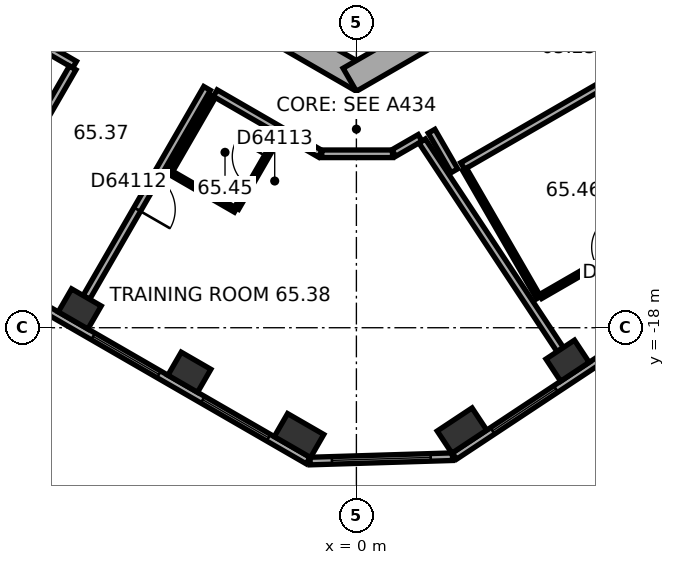
"""IFC4 building model, lengths in metres.
Left out: names, types, materials, properties, quantities, classifications, styles, units other than length and angle.
Written with IfcOpenShell. Run it as: python <this file> out.ifc"""

import sys

from ifc_helpers import new_model, si_unit, direction, frame, frame_2d, origin, origin_2d, place, context, subcontext, project, spatial, rectangle, extrude, element, fill, save


model = new_model("IFC4")
c1 = context("Model", 3, precision=1e-05, world=origin(), true_north=direction((0.0, 1.0)))
c2 = subcontext(c1, "Body", "Model", "MODEL_VIEW")
j1 = project(units=[si_unit("LENGTHUNIT", "METRE"), si_unit("PLANEANGLEUNIT", "RADIAN")], contexts=[c1])
p1 = place(None, origin())
s1 = spatial("IfcSite", under=j1, at=p1, CompositionType="ELEMENT")
p2 = place(p1, origin())
s2 = spatial("IfcBuilding", under=s1, at=p2, CompositionType="ELEMENT")
p3 = place(p2, frame((0.0, 0.0, 263.5)))
s3 = spatial("IfcBuildingStorey", under=s2, at=p3, CompositionType="ELEMENT", Elevation=263.5)
for number, where, z_axis, x_axis in (
    (1, (-7.28, -17.505, 0.0), (0.0, 0.0, 1.0), (0.866, -0.5, 0.0)),
    (2, (-4.395, -19.171, 0.0), (0.0, 0.0, 1.0), (0.866, -0.5, 0.0)),
):
    element("IfcColumn", number, at=place(p3, frame(where, z_axis=z_axis, x_axis=x_axis)), inside=s3, PredefinedType="COLUMN", context=c2, shape_type="SweptSolid", body=[
        extrude(rectangle(XDim=0.9, YDim=0.7, at=origin_2d()), origin(), (0.0, 0.0, 1.0), 3.7),
    ])
for number, where, z_axis, x_axis in (
    (3, (-1.509, -20.837, 0.0), (0.0, 0.0, 1.0), (0.866, -0.5, 0.0)),
    (4, (2.778, -20.706, 0.0), (0.0, 0.0, 1.0), (0.834, 0.552, 0.0)),
):
    element("IfcColumn", number, at=place(p3, frame(where, z_axis=z_axis, x_axis=x_axis)), inside=s3, PredefinedType="COLUMN", context=c2, shape_type="SweptSolid", body=[
        extrude(rectangle(XDim=1.1, YDim=0.7, at=origin_2d()), origin(), (0.0, 0.0, 1.0), 3.7),
    ])
p4 = place(p3, frame((5.557, -18.867, 0.0), z_axis=(0.0, 0.0, 1.0), x_axis=(0.833885822067, 0.551936985312, 0.0)))
e5 = element("IfcColumn", 5, at=p4, inside=s3, PredefinedType="COLUMN", context=c2, shape_type="SweptSolid", body=[
    extrude(rectangle(XDim=0.9, YDim=0.7, at=origin_2d()), origin(), (0.0, 0.0, 1.0), 3.7),
])
p5 = place(p3, frame((-10.025, -5.586, 0.0), z_axis=(0.0, 0.0, 1.0), x_axis=(0.866026453023, -0.499998182661, 0.0)))
e6 = element("IfcWall", 6, at=p5, inside=s3, PredefinedType="SHEAR", context=c2, shape_type="SweptSolid", body=[
    extrude(rectangle(XDim=11.778, YDim=0.7, at=frame_2d((5.889, 0.0))), origin(), (0.0, 0.0, 1.0), 3.7),
])
p6 = place(p5, frame((6.089, 0.0, 0.0)))
e7 = element("IfcOpeningElement", 7, at=p6, cuts=e6, PredefinedType="OPENING", context=c2, shape_type="SweptSolid", body=[
    extrude(rectangle(XDim=1.5, YDim=2.1, at=frame_2d((0.75, 1.05))), frame((0.0, 0.36, 0.0), z_axis=(0.0, -1.0, 0.0), x_axis=(1.0, 0.0, 0.0)), (0.0, 0.0, 1.0), 0.72),
])
p7 = place(p5, frame((1.539, 0.0, 0.0)))
e8 = element("IfcOpeningElement", 8, at=p7, cuts=e6, PredefinedType="OPENING", context=c2, shape_type="SweptSolid", body=[
    extrude(rectangle(XDim=1.1, YDim=2.1, at=frame_2d((0.55, 1.05))), frame((0.0, 0.36, 0.0), z_axis=(0.0, -1.0, 0.0), x_axis=(1.0, 0.0, 0.0)), (0.0, 0.0, 1.0), 0.72),
])
p8 = place(p5, frame((4.139, 0.0, 0.0)))
e9 = element("IfcOpeningElement", 9, at=p8, cuts=e6, PredefinedType="OPENING", context=c2, shape_type="SweptSolid", body=[
    extrude(rectangle(XDim=1.1, YDim=2.1, at=frame_2d((0.55, 1.05))), frame((0.0, 0.36, 0.0), z_axis=(0.0, -1.0, 0.0), x_axis=(1.0, 0.0, 0.0)), (0.0, 0.0, 1.0), 0.72),
])
p9 = place(p3, frame((-0.175, -11.475, 0.0), z_axis=(0.0, 0.0, 1.0), x_axis=(0.866026453023, 0.499998182661, 0.0)))
e10 = element("IfcWall", 10, at=p9, inside=s3, PredefinedType="SHEAR", context=c2, shape_type="SweptSolid", body=[
    extrude(rectangle(XDim=11.778, YDim=0.7, at=frame_2d((5.889, 0.0))), origin(), (0.0, 0.0, 1.0), 3.7),
])
p10 = place(p9, frame((2.439, 0.0, 0.0)))
e11 = element("IfcOpeningElement", 11, at=p10, cuts=e10, PredefinedType="OPENING", context=c2, shape_type="SweptSolid", body=[
    extrude(rectangle(XDim=1.1, YDim=2.1, at=frame_2d((0.55, 1.05))), frame((0.0, 0.36, 0.0), z_axis=(0.0, -1.0, 0.0), x_axis=(1.0, 0.0, 0.0)), (0.0, 0.0, 1.0), 0.72),
])
p11 = place(p9, frame((5.039, 0.0, 0.0)))
e12 = element("IfcOpeningElement", 12, at=p11, cuts=e10, PredefinedType="OPENING", context=c2, shape_type="SweptSolid", body=[
    extrude(rectangle(XDim=1.1, YDim=2.1, at=frame_2d((0.55, 1.05))), frame((0.0, 0.36, 0.0), z_axis=(0.0, -1.0, 0.0), x_axis=(1.0, 0.0, 0.0)), (0.0, 0.0, 1.0), 0.72),
])
p12 = place(p9, frame((7.639, 0.0, 0.0)))
e13 = element("IfcOpeningElement", 13, at=p12, cuts=e10, PredefinedType="OPENING", context=c2, shape_type="SweptSolid", body=[
    extrude(rectangle(XDim=1.1, YDim=2.1, at=frame_2d((0.55, 1.05))), frame((0.0, 0.36, 0.0), z_axis=(0.0, -1.0, 0.0), x_axis=(1.0, 0.0, 0.0)), (0.0, 0.0, 1.0), 0.72),
])
p13 = place(p3, frame((-16.626, -12.629, 0.0), z_axis=(0.0, 0.0, 1.0), x_axis=(0.866026460444, -0.499998169808, 0.0)))
e14 = element("IfcWall", 14, at=p13, inside=s3, PredefinedType="STANDARD", context=c2, shape_type="SweptSolid", body=[
    extrude(rectangle(XDim=17.731, YDim=0.2, at=frame_2d((8.866, 0.0))), origin(), (0.0, 0.0, 1.0), 3.7),
])
p14 = place(p13, frame((1.203, 0.0, 0.9)))
e15 = element("IfcOpeningElement", 15, at=p14, cuts=e14, PredefinedType="OPENING", context=c2, shape_type="SweptSolid", body=[
    extrude(rectangle(XDim=2.0, YDim=2.0, at=frame_2d((1.0, 1.0))), frame((0.0, 0.11, 0.0), z_axis=(0.0, -1.0, 0.0), x_axis=(1.0, 0.0, 0.0)), (0.0, 0.0, 1.0), 0.22),
])
p15 = place(p13, frame((4.535, 0.0, 0.9)))
e16 = element("IfcOpeningElement", 16, at=p15, cuts=e14, PredefinedType="OPENING", context=c2, shape_type="SweptSolid", body=[
    extrude(rectangle(XDim=2.0, YDim=2.0, at=frame_2d((1.0, 1.0))), frame((0.0, 0.11, 0.0), z_axis=(0.0, -1.0, 0.0), x_axis=(1.0, 0.0, 0.0)), (0.0, 0.0, 1.0), 0.22),
])
p16 = place(p13, frame((7.867, 0.0, 0.9)))
e17 = element("IfcOpeningElement", 17, at=p16, cuts=e14, PredefinedType="OPENING", context=c2, shape_type="SweptSolid", body=[
    extrude(rectangle(XDim=2.0, YDim=2.0, at=frame_2d((1.0, 1.0))), frame((0.0, 0.11, 0.0), z_axis=(0.0, -1.0, 0.0), x_axis=(1.0, 0.0, 0.0)), (0.0, 0.0, 1.0), 0.22),
])
p17 = place(p13, frame((11.198, 0.0, 0.9)))
e18 = element("IfcOpeningElement", 18, at=p17, cuts=e14, PredefinedType="OPENING", context=c2, shape_type="SweptSolid", body=[
    extrude(rectangle(XDim=2.0, YDim=2.0, at=frame_2d((1.0, 1.0))), frame((0.0, 0.11, 0.0), z_axis=(0.0, -1.0, 0.0), x_axis=(1.0, 0.0, 0.0)), (0.0, 0.0, 1.0), 0.22),
])
p18 = place(p13, frame((14.53, 0.0, 0.9)))
e19 = element("IfcOpeningElement", 19, at=p18, cuts=e14, PredefinedType="OPENING", context=c2, shape_type="SweptSolid", body=[
    extrude(rectangle(XDim=2.0, YDim=2.0, at=frame_2d((1.0, 1.0))), frame((0.0, 0.11, 0.0), z_axis=(0.0, -1.0, 0.0), x_axis=(1.0, 0.0, 0.0)), (0.0, 0.0, 1.0), 0.22),
])
p19 = place(p3, frame((-1.217, -21.508, 0.0), z_axis=(0.0, 0.0, 1.0), x_axis=(0.99953295295, 0.030559384285, 0.0)))
e20 = element("IfcWall", 20, at=p19, inside=s3, PredefinedType="STANDARD", context=c2, shape_type="SweptSolid", body=[
    extrude(rectangle(XDim=3.747, YDim=0.2, at=frame_2d((1.874, 0.0))), origin(), (0.0, 0.0, 1.0), 3.7),
])
p20 = place(p19, frame((0.573, 0.0, 0.9)))
e21 = element("IfcOpeningElement", 21, at=p20, cuts=e20, PredefinedType="OPENING", context=c2, shape_type="SweptSolid", body=[
    extrude(rectangle(XDim=2.6, YDim=2.0, at=frame_2d((1.3, 1.0))), frame((0.0, 0.11, 0.0), z_axis=(0.0, -1.0, 0.0), x_axis=(1.0, 0.0, 0.0)), (0.0, 0.0, 1.0), 0.22),
])
p21 = place(p3, frame((2.58, -21.377, 0.0), z_axis=(0.0, 0.0, 1.0), x_axis=(0.833888592176, 0.551932800112, 0.0)))
e22 = element("IfcWall", 22, at=p21, inside=s3, PredefinedType="STANDARD", context=c2, shape_type="SweptSolid", body=[
    extrude(rectangle(XDim=17.731, YDim=0.2, at=frame_2d((8.866, 0.0))), origin(), (0.0, 0.0, 1.0), 3.7),
])
p22 = place(p21, frame((1.202, 0.0, 0.9)))
e23 = element("IfcOpeningElement", 23, at=p22, cuts=e22, PredefinedType="OPENING", context=c2, shape_type="SweptSolid", body=[
    extrude(rectangle(XDim=2.0, YDim=2.0, at=frame_2d((1.0, 1.0))), frame((0.0, 0.11, 0.0), z_axis=(0.0, -1.0, 0.0), x_axis=(1.0, 0.0, 0.0)), (0.0, 0.0, 1.0), 0.22),
])
p23 = place(p21, frame((4.533, 0.0, 0.9)))
e24 = element("IfcOpeningElement", 24, at=p23, cuts=e22, PredefinedType="OPENING", context=c2, shape_type="SweptSolid", body=[
    extrude(rectangle(XDim=2.0, YDim=2.0, at=frame_2d((1.0, 1.0))), frame((0.0, 0.11, 0.0), z_axis=(0.0, -1.0, 0.0), x_axis=(1.0, 0.0, 0.0)), (0.0, 0.0, 1.0), 0.22),
])
p24 = place(p21, frame((7.865, 0.0, 0.9)))
e25 = element("IfcOpeningElement", 25, at=p24, cuts=e22, PredefinedType="OPENING", context=c2, shape_type="SweptSolid", body=[
    extrude(rectangle(XDim=2.0, YDim=2.0, at=frame_2d((1.0, 1.0))), frame((0.0, 0.11, 0.0), z_axis=(0.0, -1.0, 0.0), x_axis=(1.0, 0.0, 0.0)), (0.0, 0.0, 1.0), 0.22),
])
p25 = place(p21, frame((11.197, 0.0, 0.9)))
e26 = element("IfcOpeningElement", 26, at=p25, cuts=e22, PredefinedType="OPENING", context=c2, shape_type="SweptSolid", body=[
    extrude(rectangle(XDim=2.0, YDim=2.0, at=frame_2d((1.0, 1.0))), frame((0.0, 0.11, 0.0), z_axis=(0.0, -1.0, 0.0), x_axis=(1.0, 0.0, 0.0)), (0.0, 0.0, 1.0), 0.22),
])
p26 = place(p21, frame((14.528, 0.0, 0.9)))
e27 = element("IfcOpeningElement", 27, at=p26, cuts=e22, PredefinedType="OPENING", context=c2, shape_type="SweptSolid", body=[
    extrude(rectangle(XDim=2.0, YDim=2.0, at=frame_2d((1.0, 1.0))), frame((0.0, 0.11, 0.0), z_axis=(0.0, -1.0, 0.0), x_axis=(1.0, 0.0, 0.0)), (0.0, 0.0, 1.0), 0.22),
])
p27 = place(p3, frame((-11.501, -8.719, 0.0), z_axis=(0.0, 0.0, 1.0), x_axis=(0.866024434742, -0.500001678427, 0.0)))
e28 = element("IfcWall", 28, at=p27, inside=s3, PredefinedType="PARTITIONING", context=c2, shape_type="SweptSolid", body=[
    extrude(rectangle(XDim=4.718, YDim=0.2, at=frame_2d((2.359, 0.0))), origin(), (0.0, 0.0, 1.0), 3.42),
])
p28 = place(p3, frame((-9.99, -15.537, 0.0), z_axis=(0.0, 0.0, 1.0), x_axis=(0.499966611936, 0.866044679534, 0.0)))
e29 = element("IfcWall", 29, at=p28, inside=s3, PredefinedType="PARTITIONING", context=c2, shape_type="SweptSolid", body=[
    extrude(rectangle(XDim=5.049, YDim=0.2, at=frame_2d((2.524, 0.0))), origin(), (0.0, 0.0, 1.0), 2.87),
])
p29 = place(p28, frame((2.024, 0.0, 0.0)))
e30 = element("IfcOpeningElement", 30, at=p29, cuts=e29, PredefinedType="OPENING", context=c2, shape_type="SweptSolid", body=[
    extrude(rectangle(XDim=1.0, YDim=2.1, at=frame_2d((0.5, 1.05))), frame((0.0, 0.11, 0.0), z_axis=(0.0, -1.0, 0.0), x_axis=(1.0, 0.0, 0.0)), (0.0, 0.0, 1.0), 0.22),
])
p30 = place(p3, frame((-7.105, -17.202, 0.0), z_axis=(0.0, 0.0, 1.0), x_axis=(0.499988692146, 0.866031932279, 0.0)))
e31 = element("IfcWall", 31, at=p30, inside=s3, PredefinedType="PARTITIONING", context=c2, shape_type="SweptSolid", body=[
    extrude(rectangle(XDim=6.35, YDim=0.2, at=frame_2d((3.175, 0.0))), origin(), (0.0, 0.0, 1.0), 3.42),
])
p31 = place(p30, frame((2.675, 0.0, 0.0)))
e32 = element("IfcOpeningElement", 32, at=p31, cuts=e31, PredefinedType="OPENING", context=c2, shape_type="SweptSolid", body=[
    extrude(rectangle(XDim=1.0, YDim=2.1, at=frame_2d((0.5, 1.05))), frame((0.0, 0.11, 0.0), z_axis=(0.0, -1.0, 0.0), x_axis=(1.0, 0.0, 0.0)), (0.0, 0.0, 1.0), 0.22),
])
p32 = place(p3, frame((-4.913, -13.906, 0.0), z_axis=(0.0, 0.0, 1.0), x_axis=(0.500031774688, 0.866007057882, 0.0)))
e33 = element("IfcWall", 33, at=p32, inside=s3, PredefinedType="PARTITIONING", context=c2, shape_type="SweptSolid", body=[
    extrude(rectangle(XDim=2.3, YDim=0.12, at=frame_2d((1.15, 0.0))), origin(), (0.0, 0.0, 1.0), 3.42),
])
p33 = place(p3, frame((-3.713, -11.828, 0.0), z_axis=(0.0, 0.0, 1.0), x_axis=(0.866026321388, -0.499998410661, 0.0)))
e34 = element("IfcWall", 34, at=p33, inside=s3, PredefinedType="PARTITIONING", context=c2, shape_type="SweptSolid", body=[
    extrude(rectangle(XDim=3.191, YDim=0.2, at=frame_2d((1.595, 0.0))), origin(), (0.0, 0.0, 1.0), 3.42),
])
p34 = place(p3, frame((-3.181, -14.906, 0.0), z_axis=(0.0, 0.0, 1.0), x_axis=(-0.866043088465, 0.499969367985, 0.0)))
e35 = element("IfcWall", 35, at=p34, inside=s3, PredefinedType="PARTITIONING", context=c2, shape_type="SweptSolid", body=[
    extrude(rectangle(XDim=1.94, YDim=0.12, at=frame_2d((0.97, 0.0))), origin(), (0.0, 0.0, 1.0), 3.42),
])
p35 = place(p3, frame((-2.031, -12.915, 0.0), z_axis=(0.0, 0.0, 1.0), x_axis=(-0.49994888933, -0.866054910533, 0.0)))
e36 = element("IfcWall", 36, at=p35, inside=s3, PredefinedType="PARTITIONING", context=c2, shape_type="SweptSolid", body=[
    extrude(rectangle(XDim=2.24, YDim=0.12, at=frame_2d((1.12, 0.0))), origin(), (0.0, 0.0, 1.0), 3.42),
])
p36 = place(p35, frame((0.67, 0.0, 0.0)))
e37 = element("IfcOpeningElement", 37, at=p36, cuts=e36, PredefinedType="OPENING", context=c2, shape_type="SweptSolid", body=[
    extrude(rectangle(XDim=0.9, YDim=2.1, at=frame_2d((0.45, 1.05))), frame((0.0, 0.07, 0.0), z_axis=(0.0, -1.0, 0.0), x_axis=(1.0, 0.0, 0.0)), (0.0, 0.0, 1.0), 0.14),
])
p37 = place(p3, frame((-0.91, -13.423, 0.0), z_axis=(0.0, 0.0, 1.0), x_axis=(1.0, 0.0, 0.0)))
e38 = element("IfcWall", 38, at=p37, inside=s3, PredefinedType="PARTITIONING", context=c2, shape_type="SweptSolid", body=[
    extrude(rectangle(XDim=1.86, YDim=0.2, at=frame_2d((0.93, 0.0))), origin(), (0.0, 0.0, 1.0), 3.42),
])
p38 = place(p3, frame((0.985, -13.403, 0.0), z_axis=(0.0, 0.0, 1.0), x_axis=(0.866032814021, 0.499987164874, 0.0)))
e39 = element("IfcWall", 39, at=p38, inside=s3, PredefinedType="PARTITIONING", context=c2, shape_type="SweptSolid", body=[
    extrude(rectangle(XDim=0.798, YDim=0.2, at=frame_2d((0.399, 0.0))), origin(), (0.0, 0.0, 1.0), 3.42),
])
p39 = place(p3, frame((1.979, -12.829, 0.0), z_axis=(0.0, 0.0, 1.0), x_axis=(0.500074377092, -0.865982457891, 0.0)))
e40 = element("IfcWall", 40, at=p39, inside=s3, PredefinedType="PARTITIONING", context=c2, shape_type="SweptSolid", body=[
    extrude(rectangle(XDim=1.201, YDim=0.2, at=frame_2d((0.601, 0.0))), origin(), (0.0, 0.0, 1.0), 3.42),
])
p40 = place(p3, frame((2.796, -13.744, 0.0), z_axis=(0.0, 0.0, 1.0), x_axis=(0.866018331238, 0.50001224981, 0.0)))
e41 = element("IfcWall", 41, at=p40, inside=s3, PredefinedType="PARTITIONING", context=c2, shape_type="SweptSolid", body=[
    extrude(rectangle(XDim=4.4, YDim=0.2, at=frame_2d((2.2, 0.0))), origin(), (0.0, 0.0, 1.0), 3.42),
])
p41 = place(p3, frame((4.796, -17.208, 0.0), z_axis=(0.0, 0.0, 1.0), x_axis=(-0.500043961785, 0.866000020948, 0.0)))
e42 = element("IfcWall", 42, at=p41, inside=s3, PredefinedType="PARTITIONING", context=c2, shape_type="SweptSolid", body=[
    extrude(rectangle(XDim=3.9, YDim=0.12, at=frame_2d((1.95, 0.0))), origin(), (0.0, 0.0, 1.0), 3.42),
])
p42 = place(p3, frame((5.364, -18.575, 0.0), z_axis=(0.0, 0.0, 1.0), x_axis=(-0.55195757761, 0.833872191957, 0.0)))
e43 = element("IfcWall", 43, at=p42, inside=s3, PredefinedType="PARTITIONING", context=c2, shape_type="SweptSolid", body=[
    extrude(rectangle(XDim=6.581, YDim=0.2, at=frame_2d((3.291, 0.0))), origin(), (0.0, 0.0, 1.0), 3.42),
])
p43 = place(p3, frame((8.554, -15.039, 0.0), z_axis=(0.0, 0.0, 1.0), x_axis=(-0.865994635417, -0.500053288589, 0.0)))
e44 = element("IfcWall", 44, at=p43, inside=s3, PredefinedType="PARTITIONING", context=c2, shape_type="SweptSolid", body=[
    extrude(rectangle(XDim=4.28, YDim=0.12, at=frame_2d((2.14, 0.0))), origin(), (0.0, 0.0, 1.0), 3.42),
])
p44 = place(p43, frame((1.69, 0.0, 0.0)))
e45 = element("IfcOpeningElement", 45, at=p44, cuts=e44, PredefinedType="OPENING", context=c2, shape_type="SweptSolid", body=[
    extrude(rectangle(XDim=0.9, YDim=2.1, at=frame_2d((0.45, 1.05))), frame((0.0, 0.07, 0.0), z_axis=(0.0, -1.0, 0.0), x_axis=(1.0, 0.0, 0.0)), (0.0, 0.0, 1.0), 0.14),
])
p45 = place(p17, origin())
e46 = element("IfcWindow", 46, at=p45, inside=s3, PartitioningType="SINGLE_PANEL", PredefinedType="WINDOW", context=c2, shape_type="SweptSolid", body=[
    extrude(rectangle(XDim=2.0, YDim=2.0, at=frame_2d((1.0, 1.0))), frame((0.0, 0.03, 0.0), z_axis=(0.0, -1.0, 0.0), x_axis=(1.0, 0.0, 0.0)), (0.0, 0.0, 1.0), 0.06),
])
fill(e18, e46)
p46 = place(p18, origin())
e47 = element("IfcWindow", 47, at=p46, inside=s3, PartitioningType="SINGLE_PANEL", PredefinedType="WINDOW", context=c2, shape_type="SweptSolid", body=[
    extrude(rectangle(XDim=2.0, YDim=2.0, at=frame_2d((1.0, 1.0))), frame((0.0, 0.03, 0.0), z_axis=(0.0, -1.0, 0.0), x_axis=(1.0, 0.0, 0.0)), (0.0, 0.0, 1.0), 0.06),
])
fill(e19, e47)
p47 = place(p20, origin())
e48 = element("IfcWindow", 48, at=p47, inside=s3, PartitioningType="SINGLE_PANEL", PredefinedType="WINDOW", context=c2, shape_type="SweptSolid", body=[
    extrude(rectangle(XDim=2.6, YDim=2.0, at=frame_2d((1.3, 1.0))), frame((0.0, 0.03, 0.0), z_axis=(0.0, -1.0, 0.0), x_axis=(1.0, 0.0, 0.0)), (0.0, 0.0, 1.0), 0.06),
])
fill(e21, e48)
p48 = place(p22, origin())
e49 = element("IfcWindow", 49, at=p48, inside=s3, PartitioningType="SINGLE_PANEL", PredefinedType="WINDOW", context=c2, shape_type="SweptSolid", body=[
    extrude(rectangle(XDim=2.0, YDim=2.0, at=frame_2d((1.0, 1.0))), frame((0.0, 0.03, 0.0), z_axis=(0.0, -1.0, 0.0), x_axis=(1.0, 0.0, 0.0)), (0.0, 0.0, 1.0), 0.06),
])
fill(e23, e49)
p49 = place(p31, origin())
e50 = element("IfcDoor", 50, at=p49, inside=s3, OperationType="SINGLE_SWING_LEFT", PredefinedType="DOOR", context=c2, shape_type="SweptSolid", body=[
    extrude(rectangle(XDim=1.0, YDim=2.1, at=frame_2d((0.5, 1.05))), frame((0.0, 0.025, 0.0), z_axis=(0.0, -1.0, 0.0), x_axis=(1.0, 0.0, 0.0)), (0.0, 0.0, 1.0), 0.05),
])
fill(e32, e50)
p50 = place(p36, origin())
e51 = element("IfcDoor", 51, at=p50, inside=s3, OperationType="SINGLE_SWING_LEFT", PredefinedType="DOOR", context=c2, shape_type="SweptSolid", body=[
    extrude(rectangle(XDim=0.9, YDim=2.1, at=frame_2d((0.45, 1.05))), frame((0.0, 0.025, 0.0), z_axis=(0.0, -1.0, 0.0), x_axis=(1.0, 0.0, 0.0)), (0.0, 0.0, 1.0), 0.05),
])
fill(e37, e51)
save(model, sys.argv[1])
